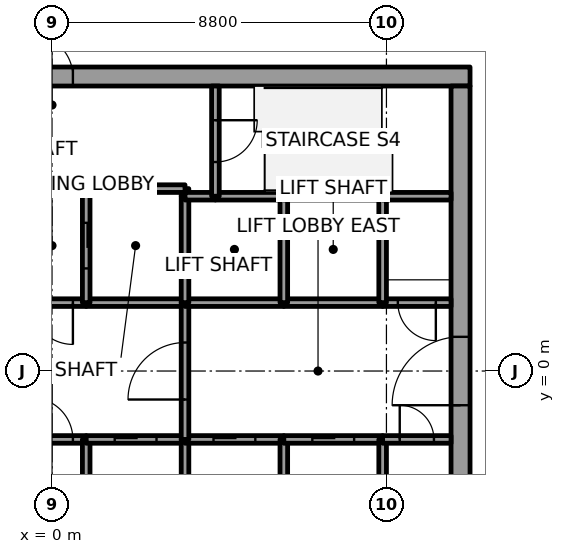
"""IFC4 building model, lengths in metres.
Left out: names, types, materials, properties, quantities, classifications, styles, units other than length and angle.
Written with IfcOpenShell. Run it as: python <this file> out.ifc"""

import sys

from ifc_helpers import new_model, si_unit, direction, frame, frame_2d, origin, place, context, subcontext, project, spatial, rectangle, extrude, element, fill, save


model = new_model("IFC4")
c1 = context("Model", 3, precision=1e-05, world=origin(), true_north=direction((0.0, 1.0)))
c2 = subcontext(c1, "Body", "Model", "MODEL_VIEW")
j1 = project(units=[si_unit("LENGTHUNIT", "METRE"), si_unit("PLANEANGLEUNIT", "RADIAN")], contexts=[c1])
p1 = place(None, origin())
s1 = spatial("IfcSite", under=j1, at=p1, CompositionType="ELEMENT")
p2 = place(p1, origin())
s2 = spatial("IfcBuilding", under=s1, at=p2, CompositionType="ELEMENT")
p3 = place(p2, frame((0.0, 0.0, 209.8)))
s3 = spatial("IfcBuildingStorey", under=s2, at=p3, CompositionType="ELEMENT", Elevation=209.8)
p4 = place(p3, frame((-11.0, 7.75, 0.0), z_axis=(0.0, 0.0, 1.0), x_axis=(1.0, 0.0, 0.0)))
e1 = element("IfcWall", 1, at=p4, inside=s3, PredefinedType="SHEAR", context=c2, shape_type="SweptSolid", body=[
    extrude(rectangle(XDim=22.0, YDim=0.5, at=frame_2d((11.0, 0.0))), origin(), (0.0, 0.0, 1.0), 4.0),
])
p5 = place(p4, frame((10.45, 0.0, 0.0)))
e2 = element("IfcOpeningElement", 2, at=p5, cuts=e1, PredefinedType="OPENING", context=c2, shape_type="SweptSolid", body=[
    extrude(rectangle(XDim=1.1, YDim=2.1, at=frame_2d((0.55, 1.05))), frame((0.0, 0.25, 0.0), z_axis=(0.0, -1.0, 0.0), x_axis=(1.0, 0.0, 0.0)), (0.0, 0.0, 1.0), 0.5),
])
p6 = place(p3, frame((10.75, -7.5, 0.0), z_axis=(0.0, 0.0, 1.0), x_axis=(0.0, 1.0, 0.0)))
e3 = element("IfcWall", 3, at=p6, inside=s3, PredefinedType="SHEAR", context=c2, shape_type="SweptSolid", body=[
    extrude(rectangle(XDim=15.0, YDim=0.5, at=frame_2d((7.5, 0.0))), origin(), (0.0, 0.0, 1.0), 4.0),
])
p7 = place(p6, frame((6.6, 0.0, 0.0)))
e4 = element("IfcOpeningElement", 4, at=p7, cuts=e3, PredefinedType="OPENING", context=c2, shape_type="SweptSolid", body=[
    extrude(rectangle(XDim=1.8, YDim=2.1, at=frame_2d((0.9, 1.05))), frame((0.0, 0.25, 0.0), z_axis=(0.0, -1.0, 0.0), x_axis=(1.0, 0.0, 0.0)), (0.0, 0.0, 1.0), 0.5),
])
p8 = place(p3, frame((-0.9, -1.8, 0.0), z_axis=(0.0, 0.0, 1.0), x_axis=(1.0, 0.0, 0.0)))
e5 = element("IfcWall", 5, at=p8, inside=s3, PredefinedType="SOLIDWALL", context=c2, shape_type="SweptSolid", body=[
    extrude(rectangle(XDim=1.8, YDim=0.2, at=frame_2d((0.9, 0.0))), origin(), (0.0, 0.0, 1.0), 3.85),
])
p9 = place(p8, frame((0.35, 0.0, 0.0)))
e6 = element("IfcOpeningElement", 6, at=p9, cuts=e5, PredefinedType="OPENING", context=c2, shape_type="SweptSolid", body=[
    extrude(rectangle(XDim=1.1, YDim=2.1, at=frame_2d((0.55, 1.05))), frame((0.0, 0.1, 0.0), z_axis=(0.0, -1.0, 0.0), x_axis=(1.0, 0.0, 0.0)), (0.0, 0.0, 1.0), 0.2),
])
p10 = place(p3, frame((0.9, 1.8, 0.0), z_axis=(0.0, 0.0, 1.0), x_axis=(-1.0, 0.0, 0.0)))
e7 = element("IfcWall", 7, at=p10, inside=s3, PredefinedType="SOLIDWALL", context=c2, shape_type="SweptSolid", body=[
    extrude(rectangle(XDim=1.8, YDim=0.2, at=frame_2d((0.9, 0.0))), origin(), (0.0, 0.0, 1.0), 3.85),
])
p11 = place(p10, frame((0.35, 0.0, 0.0)))
e8 = element("IfcOpeningElement", 8, at=p11, cuts=e7, PredefinedType="OPENING", context=c2, shape_type="SweptSolid", body=[
    extrude(rectangle(XDim=1.1, YDim=2.1, at=frame_2d((0.55, 1.05))), frame((0.0, 0.1, 0.0), z_axis=(0.0, -1.0, 0.0), x_axis=(1.0, 0.0, 0.0)), (0.0, 0.0, 1.0), 0.2),
])
p12 = place(p3, frame((0.9, -1.8, 0.0), z_axis=(0.0, 0.0, 1.0), x_axis=(0.0, -1.0, 0.0)))
e9 = element("IfcWall", 9, at=p12, inside=s3, PredefinedType="SOLIDWALL", context=c2, shape_type="SweptSolid", body=[
    extrude(rectangle(XDim=2.8, YDim=0.2, at=frame_2d((1.4, 0.0))), origin(), (0.0, 0.0, 1.0), 3.85),
])
p13 = place(p3, frame((0.9, -1.8, 0.0), z_axis=(0.0, 0.0, 1.0), x_axis=(1.0, 0.0, 0.0)))
e10 = element("IfcWall", 10, at=p13, inside=s3, PredefinedType="SOLIDWALL", context=c2, shape_type="SweptSolid", body=[
    extrude(rectangle(XDim=2.6, YDim=0.2, at=frame_2d((1.3, 0.0))), origin(), (0.0, 0.0, 1.0), 3.85),
])
p14 = place(p13, frame((0.75, 0.0, 0.0)))
e11 = element("IfcOpeningElement", 11, at=p14, cuts=e10, PredefinedType="OPENING", context=c2, shape_type="SweptSolid", body=[
    extrude(rectangle(XDim=1.1, YDim=2.1, at=frame_2d((0.55, 1.05))), frame((0.0, 0.1, 0.0), z_axis=(0.0, -1.0, 0.0), x_axis=(1.0, 0.0, 0.0)), (0.0, 0.0, 1.0), 0.2),
])
p15 = place(p3, frame((3.5, 1.8, 0.0), z_axis=(0.0, 0.0, 1.0), x_axis=(-1.0, 0.0, 0.0)))
e12 = element("IfcWall", 12, at=p15, inside=s3, PredefinedType="SOLIDWALL", context=c2, shape_type="SweptSolid", body=[
    extrude(rectangle(XDim=2.6, YDim=0.2, at=frame_2d((1.3, 0.0))), origin(), (0.0, 0.0, 1.0), 3.85),
])
p16 = place(p3, frame((3.5, 4.6, 0.0), z_axis=(0.0, 0.0, 1.0), x_axis=(0.0, 1.0, 0.0)))
e13 = element("IfcWall", 13, at=p16, inside=s3, PredefinedType="SOLIDWALL", context=c2, shape_type="SweptSolid", body=[
    extrude(rectangle(XDim=0.2, YDim=0.2, at=frame_2d((0.1, 0.0))), origin(), (0.0, 0.0, 1.0), 3.85),
])
p17 = place(p3, frame((3.5, 4.8, 0.0), z_axis=(0.0, 0.0, 1.0), x_axis=(-1.0, 0.0, 0.0)))
e14 = element("IfcWall", 14, at=p17, inside=s3, PredefinedType="SOLIDWALL", context=c2, shape_type="SweptSolid", body=[
    extrude(rectangle(XDim=2.6, YDim=0.2, at=frame_2d((1.3, 0.0))), origin(), (0.0, 0.0, 1.0), 3.85),
])
p18 = place(p3, frame((0.9, 4.8, 0.0), z_axis=(0.0, 0.0, 1.0), x_axis=(0.0, -1.0, 0.0)))
e15 = element("IfcWall", 15, at=p18, inside=s3, PredefinedType="SOLIDWALL", context=c2, shape_type="SweptSolid", body=[
    extrude(rectangle(XDim=3.0, YDim=0.2, at=frame_2d((1.5, 0.0))), origin(), (0.0, 0.0, 1.0), 3.85),
])
p19 = place(p18, frame((0.9, 0.0, 0.0)))
e16 = element("IfcOpeningElement", 16, at=p19, cuts=e15, PredefinedType="OPENING", context=c2, shape_type="SweptSolid", body=[
    extrude(rectangle(XDim=1.2, YDim=2.1, at=frame_2d((0.6, 1.05))), frame((0.0, 0.1, 0.0), z_axis=(0.0, -1.0, 0.0), x_axis=(1.0, 0.0, 0.0)), (0.0, 0.0, 1.0), 0.2),
])
p20 = place(p3, frame((3.5, -4.6, 0.0), z_axis=(0.0, 0.0, 1.0), x_axis=(0.0, 1.0, 0.0)))
e17 = element("IfcWall", 17, at=p20, inside=s3, PredefinedType="SOLIDWALL", context=c2, shape_type="SweptSolid", body=[
    extrude(rectangle(XDim=2.8, YDim=0.2, at=frame_2d((1.4, 0.0))), origin(), (0.0, 0.0, 1.0), 3.85),
])
p21 = place(p3, frame((3.5, -1.8, 0.0), z_axis=(0.0, 0.0, 1.0), x_axis=(1.0, 0.0, 0.0)))
e18 = element("IfcWall", 18, at=p21, inside=s3, PredefinedType="SOLIDWALL", context=c2, shape_type="SweptSolid", body=[
    extrude(rectangle(XDim=2.6, YDim=0.2, at=frame_2d((1.3, 0.0))), origin(), (0.0, 0.0, 1.0), 3.85),
])
p22 = place(p21, frame((0.75, 0.0, 0.0)))
e19 = element("IfcOpeningElement", 19, at=p22, cuts=e18, PredefinedType="OPENING", context=c2, shape_type="SweptSolid", body=[
    extrude(rectangle(XDim=1.1, YDim=2.1, at=frame_2d((0.55, 1.05))), frame((0.0, 0.1, 0.0), z_axis=(0.0, -1.0, 0.0), x_axis=(1.0, 0.0, 0.0)), (0.0, 0.0, 1.0), 0.2),
])
p23 = place(p3, frame((3.5, -1.8, 0.0), z_axis=(0.0, 0.0, 1.0), x_axis=(0.0, 1.0, 0.0)))
e20 = element("IfcWall", 20, at=p23, inside=s3, PredefinedType="SOLIDWALL", context=c2, shape_type="SweptSolid", body=[
    extrude(rectangle(XDim=3.6, YDim=0.2, at=frame_2d((1.8, 0.0))), origin(), (0.0, 0.0, 1.0), 3.85),
])
p24 = place(p23, frame((1.05, 0.0, 0.0)))
e21 = element("IfcOpeningElement", 21, at=p24, cuts=e20, PredefinedType="OPENING", context=c2, shape_type="SweptSolid", body=[
    extrude(rectangle(XDim=1.5, YDim=2.1, at=frame_2d((0.75, 1.05))), frame((0.0, 0.1, 0.0), z_axis=(0.0, -1.0, 0.0), x_axis=(1.0, 0.0, 0.0)), (0.0, 0.0, 1.0), 0.2),
])
p25 = place(p3, frame((6.1, 1.8, 0.0), z_axis=(0.0, 0.0, 1.0), x_axis=(-1.0, 0.0, 0.0)))
e22 = element("IfcWall", 22, at=p25, inside=s3, PredefinedType="SOLIDWALL", context=c2, shape_type="SweptSolid", body=[
    extrude(rectangle(XDim=2.6, YDim=0.2, at=frame_2d((1.3, 0.0))), origin(), (0.0, 0.0, 1.0), 3.85),
])
p26 = place(p3, frame((3.5, 1.8, 0.0), z_axis=(0.0, 0.0, 1.0), x_axis=(0.0, 1.0, 0.0)))
e23 = element("IfcWall", 23, at=p26, inside=s3, PredefinedType="SOLIDWALL", context=c2, shape_type="SweptSolid", body=[
    extrude(rectangle(XDim=2.8, YDim=0.2, at=frame_2d((1.4, 0.0))), origin(), (0.0, 0.0, 1.0), 3.85),
])
p27 = place(p3, frame((4.3, 4.6, 0.0), z_axis=(0.0, 0.0, 1.0), x_axis=(-1.0, 0.0, 0.0)))
e24 = element("IfcWall", 24, at=p27, inside=s3, PredefinedType="SOLIDWALL", context=c2, shape_type="SweptSolid", body=[
    extrude(rectangle(XDim=0.8, YDim=0.2, at=frame_2d((0.4, 0.0))), origin(), (0.0, 0.0, 1.0), 3.85),
])
p28 = place(p3, frame((6.1, 4.6, 0.0), z_axis=(0.0, 0.0, 1.0), x_axis=(-1.0, 0.0, 0.0)))
e25 = element("IfcWall", 25, at=p28, inside=s3, PredefinedType="SOLIDWALL", context=c2, shape_type="SweptSolid", body=[
    extrude(rectangle(XDim=1.8, YDim=0.2, at=frame_2d((0.9, 0.0))), origin(), (0.0, 0.0, 1.0), 3.85),
])
p29 = place(p3, frame((4.3, 7.5, 0.0), z_axis=(0.0, 0.0, 1.0), x_axis=(0.0, -1.0, 0.0)))
e26 = element("IfcWall", 26, at=p29, inside=s3, PredefinedType="SOLIDWALL", context=c2, shape_type="SweptSolid", body=[
    extrude(rectangle(XDim=2.9, YDim=0.2, at=frame_2d((1.45, 0.0))), origin(), (0.0, 0.0, 1.0), 3.85),
])
p30 = place(p29, frame((0.9, 0.0, 0.0)))
e27 = element("IfcOpeningElement", 27, at=p30, cuts=e26, PredefinedType="OPENING", context=c2, shape_type="SweptSolid", body=[
    extrude(rectangle(XDim=1.1, YDim=2.1, at=frame_2d((0.55, 1.05))), frame((0.0, 0.1, 0.0), z_axis=(0.0, -1.0, 0.0), x_axis=(1.0, 0.0, 0.0)), (0.0, 0.0, 1.0), 0.2),
])
p31 = place(p3, frame((6.1, -4.6, 0.0), z_axis=(0.0, 0.0, 1.0), x_axis=(0.0, 1.0, 0.0)))
e28 = element("IfcWall", 28, at=p31, inside=s3, PredefinedType="SOLIDWALL", context=c2, shape_type="SweptSolid", body=[
    extrude(rectangle(XDim=2.8, YDim=0.2, at=frame_2d((1.4, 0.0))), origin(), (0.0, 0.0, 1.0), 3.85),
])
p32 = place(p3, frame((6.1, -1.8, 0.0), z_axis=(0.0, 0.0, 1.0), x_axis=(1.0, 0.0, 0.0)))
e29 = element("IfcWall", 29, at=p32, inside=s3, PredefinedType="SOLIDWALL", context=c2, shape_type="SweptSolid", body=[
    extrude(rectangle(XDim=2.6, YDim=0.2, at=frame_2d((1.3, 0.0))), origin(), (0.0, 0.0, 1.0), 3.85),
])
p33 = place(p32, frame((0.75, 0.0, 0.0)))
e30 = element("IfcOpeningElement", 30, at=p33, cuts=e29, PredefinedType="OPENING", context=c2, shape_type="SweptSolid", body=[
    extrude(rectangle(XDim=1.1, YDim=2.1, at=frame_2d((0.55, 1.05))), frame((0.0, 0.1, 0.0), z_axis=(0.0, -1.0, 0.0), x_axis=(1.0, 0.0, 0.0)), (0.0, 0.0, 1.0), 0.2),
])
p34 = place(p3, frame((8.7, 1.8, 0.0), z_axis=(0.0, 0.0, 1.0), x_axis=(-1.0, 0.0, 0.0)))
e31 = element("IfcWall", 31, at=p34, inside=s3, PredefinedType="SOLIDWALL", context=c2, shape_type="SweptSolid", body=[
    extrude(rectangle(XDim=2.6, YDim=0.2, at=frame_2d((1.3, 0.0))), origin(), (0.0, 0.0, 1.0), 3.85),
])
p35 = place(p3, frame((6.1, 1.8, 0.0), z_axis=(0.0, 0.0, 1.0), x_axis=(0.0, 1.0, 0.0)))
e32 = element("IfcWall", 32, at=p35, inside=s3, PredefinedType="SOLIDWALL", context=c2, shape_type="SweptSolid", body=[
    extrude(rectangle(XDim=2.8, YDim=0.2, at=frame_2d((1.4, 0.0))), origin(), (0.0, 0.0, 1.0), 3.85),
])
p36 = place(p3, frame((8.7, 4.6, 0.0), z_axis=(0.0, 0.0, 1.0), x_axis=(-1.0, 0.0, 0.0)))
e33 = element("IfcWall", 33, at=p36, inside=s3, PredefinedType="SOLIDWALL", context=c2, shape_type="SweptSolid", body=[
    extrude(rectangle(XDim=2.6, YDim=0.2, at=frame_2d((1.3, 0.0))), origin(), (0.0, 0.0, 1.0), 3.85),
])
p37 = place(p3, frame((8.7, -1.8, 0.0), z_axis=(0.0, 0.0, 1.0), x_axis=(0.0, -1.0, 0.0)))
e34 = element("IfcWall", 34, at=p37, inside=s3, PredefinedType="SOLIDWALL", context=c2, shape_type="SweptSolid", body=[
    extrude(rectangle(XDim=2.8, YDim=0.2, at=frame_2d((1.4, 0.0))), origin(), (0.0, 0.0, 1.0), 3.85),
])
p38 = place(p3, frame((8.7, -1.8, 0.0), z_axis=(0.0, 0.0, 1.0), x_axis=(1.0, 0.0, 0.0)))
e35 = element("IfcWall", 35, at=p38, inside=s3, PredefinedType="SOLIDWALL", context=c2, shape_type="SweptSolid", body=[
    extrude(rectangle(XDim=1.8, YDim=0.2, at=frame_2d((0.9, 0.0))), origin(), (0.0, 0.0, 1.0), 3.85),
])
p39 = place(p38, frame((0.45, 0.0, 0.0)))
e36 = element("IfcOpeningElement", 36, at=p39, cuts=e35, PredefinedType="OPENING", context=c2, shape_type="SweptSolid", body=[
    extrude(rectangle(XDim=0.9, YDim=2.1, at=frame_2d((0.45, 1.05))), frame((0.0, 0.1, 0.0), z_axis=(0.0, -1.0, 0.0), x_axis=(1.0, 0.0, 0.0)), (0.0, 0.0, 1.0), 0.2),
])
p40 = place(p3, frame((10.5, 1.8, 0.0), z_axis=(0.0, 0.0, 1.0), x_axis=(-1.0, 0.0, 0.0)))
e37 = element("IfcWall", 37, at=p40, inside=s3, PredefinedType="SOLIDWALL", context=c2, shape_type="SweptSolid", body=[
    extrude(rectangle(XDim=1.8, YDim=0.2, at=frame_2d((0.9, 0.0))), origin(), (0.0, 0.0, 1.0), 3.85),
])
p41 = place(p40, frame((0.4, 0.0, 0.0)))
e38 = element("IfcOpeningElement", 38, at=p41, cuts=e37, PredefinedType="OPENING", context=c2, shape_type="SweptSolid", body=[
    extrude(rectangle(XDim=1.0, YDim=2.1, at=frame_2d((0.5, 1.05))), frame((0.0, 0.1, 0.0), z_axis=(0.0, -1.0, 0.0), x_axis=(1.0, 0.0, 0.0)), (0.0, 0.0, 1.0), 0.2),
])
p42 = place(p3, frame((8.7, 4.6, 0.0), z_axis=(0.0, 0.0, 1.0), x_axis=(0.0, -1.0, 0.0)))
e39 = element("IfcWall", 39, at=p42, inside=s3, PredefinedType="SOLIDWALL", context=c2, shape_type="SweptSolid", body=[
    extrude(rectangle(XDim=2.8, YDim=0.2, at=frame_2d((1.4, 0.0))), origin(), (0.0, 0.0, 1.0), 3.85),
])
p43 = place(p3, frame((10.5, 4.6, 0.0), z_axis=(0.0, 0.0, 1.0), x_axis=(-1.0, 0.0, 0.0)))
e40 = element("IfcWall", 40, at=p43, inside=s3, PredefinedType="SOLIDWALL", context=c2, shape_type="SweptSolid", body=[
    extrude(rectangle(XDim=1.8, YDim=0.2, at=frame_2d((0.9, 0.0))), origin(), (0.0, 0.0, 1.0), 3.85),
])
p44 = place(p14, origin())
e41 = element("IfcDoor", 41, at=p44, inside=s3, OperationType="SLIDING_TO_LEFT", PredefinedType="DOOR", context=c2, shape_type="SweptSolid", body=[
    extrude(rectangle(XDim=1.1, YDim=2.1, at=frame_2d((0.55, 1.05))), frame((0.0, 0.025, 0.0), z_axis=(0.0, -1.0, 0.0), x_axis=(1.0, 0.0, 0.0)), (0.0, 0.0, 1.0), 0.05),
])
fill(e11, e41)
p45 = place(p22, origin())
e42 = element("IfcDoor", 42, at=p45, inside=s3, OperationType="SLIDING_TO_RIGHT", PredefinedType="DOOR", context=c2, shape_type="SweptSolid", body=[
    extrude(rectangle(XDim=1.1, YDim=2.1, at=frame_2d((0.55, 1.05))), frame((0.0, 0.025, 0.0), z_axis=(0.0, -1.0, 0.0), x_axis=(1.0, 0.0, 0.0)), (0.0, 0.0, 1.0), 0.05),
])
fill(e19, e42)
p46 = place(p33, origin())
e43 = element("IfcDoor", 43, at=p46, inside=s3, OperationType="SLIDING_TO_LEFT", PredefinedType="DOOR", context=c2, shape_type="SweptSolid", body=[
    extrude(rectangle(XDim=1.1, YDim=2.1, at=frame_2d((0.55, 1.05))), frame((0.0, 0.025, 0.0), z_axis=(0.0, -1.0, 0.0), x_axis=(1.0, 0.0, 0.0)), (0.0, 0.0, 1.0), 0.05),
])
fill(e30, e43)
p47 = place(p19, origin())
e44 = element("IfcDoor", 44, at=p47, inside=s3, OperationType="SLIDING_TO_LEFT", PredefinedType="DOOR", context=c2, shape_type="SweptSolid", body=[
    extrude(rectangle(XDim=1.2, YDim=2.1, at=frame_2d((0.6, 1.05))), frame((0.0, 0.025, 0.0), z_axis=(0.0, -1.0, 0.0), x_axis=(1.0, 0.0, 0.0)), (0.0, 0.0, 1.0), 0.05),
])
fill(e16, e44)
p48 = place(p24, origin())
e45 = element("IfcDoor", 45, at=p48, inside=s3, OperationType="DOUBLE_DOOR_SINGLE_SWING", PredefinedType="DOOR", context=c2, shape_type="SweptSolid", body=[
    extrude(rectangle(XDim=1.5, YDim=2.1, at=frame_2d((0.75, 1.05))), frame((0.0, 0.025, 0.0), z_axis=(0.0, -1.0, 0.0), x_axis=(1.0, 0.0, 0.0)), (0.0, 0.0, 1.0), 0.05),
])
fill(e21, e45)
p49 = place(p11, origin())
e46 = element("IfcDoor", 46, at=p49, inside=s3, OperationType="SINGLE_SWING_RIGHT", PredefinedType="DOOR", context=c2, shape_type="SweptSolid", body=[
    extrude(rectangle(XDim=1.1, YDim=2.1, at=frame_2d((0.55, 1.05))), frame((0.0, 0.025, 0.0), z_axis=(0.0, -1.0, 0.0), x_axis=(1.0, 0.0, 0.0)), (0.0, 0.0, 1.0), 0.05),
])
fill(e8, e46)
p50 = place(p9, origin())
e47 = element("IfcDoor", 47, at=p50, inside=s3, OperationType="SINGLE_SWING_RIGHT", PredefinedType="DOOR", context=c2, shape_type="SweptSolid", body=[
    extrude(rectangle(XDim=1.1, YDim=2.1, at=frame_2d((0.55, 1.05))), frame((0.0, 0.025, 0.0), z_axis=(0.0, -1.0, 0.0), x_axis=(1.0, 0.0, 0.0)), (0.0, 0.0, 1.0), 0.05),
])
fill(e6, e47)
p51 = place(p41, origin())
e48 = element("IfcDoor", 48, at=p51, inside=s3, OperationType="SINGLE_SWING_LEFT", PredefinedType="DOOR", context=c2, shape_type="SweptSolid", body=[
    extrude(rectangle(XDim=1.0, YDim=2.1, at=frame_2d((0.5, 1.05))), frame((0.0, 0.025, 0.0), z_axis=(0.0, -1.0, 0.0), x_axis=(1.0, 0.0, 0.0)), (0.0, 0.0, 1.0), 0.05),
])
fill(e38, e48)
p52 = place(p30, origin())
e49 = element("IfcDoor", 49, at=p52, inside=s3, OperationType="SINGLE_SWING_LEFT", PredefinedType="DOOR", context=c2, shape_type="SweptSolid", body=[
    extrude(rectangle(XDim=1.1, YDim=2.1, at=frame_2d((0.55, 1.05))), frame((0.0, 0.025, 0.0), z_axis=(0.0, -1.0, 0.0), x_axis=(1.0, 0.0, 0.0)), (0.0, 0.0, 1.0), 0.05),
])
fill(e27, e49)
p53 = place(p39, origin())
e50 = element("IfcDoor", 50, at=p53, inside=s3, OperationType="SINGLE_SWING_RIGHT", PredefinedType="DOOR", context=c2, shape_type="SweptSolid", body=[
    extrude(rectangle(XDim=0.9, YDim=2.1, at=frame_2d((0.45, 1.05))), frame((0.0, 0.025, 0.0), z_axis=(0.0, -1.0, 0.0), x_axis=(1.0, 0.0, 0.0)), (0.0, 0.0, 1.0), 0.05),
])
fill(e36, e50)
p54 = place(p7, origin())
e51 = element("IfcDoor", 51, at=p54, inside=s3, OperationType="DOUBLE_DOOR_SINGLE_SWING", PredefinedType="DOOR", context=c2, shape_type="SweptSolid", body=[
    extrude(rectangle(XDim=1.8, YDim=2.1, at=frame_2d((0.9, 1.05))), frame((0.0, 0.025, 0.0), z_axis=(0.0, -1.0, 0.0), x_axis=(1.0, 0.0, 0.0)), (0.0, 0.0, 1.0), 0.05),
])
fill(e4, e51)
p55 = place(p5, origin())
e52 = element("IfcDoor", 52, at=p55, inside=s3, OperationType="SINGLE_SWING_LEFT", PredefinedType="DOOR", context=c2, shape_type="SweptSolid", body=[
    extrude(rectangle(XDim=1.1, YDim=2.1, at=frame_2d((0.55, 1.05))), frame((0.0, 0.025, 0.0), z_axis=(0.0, -1.0, 0.0), x_axis=(1.0, 0.0, 0.0)), (0.0, 0.0, 1.0), 0.05),
])
fill(e2, e52)
save(model, sys.argv[1])
